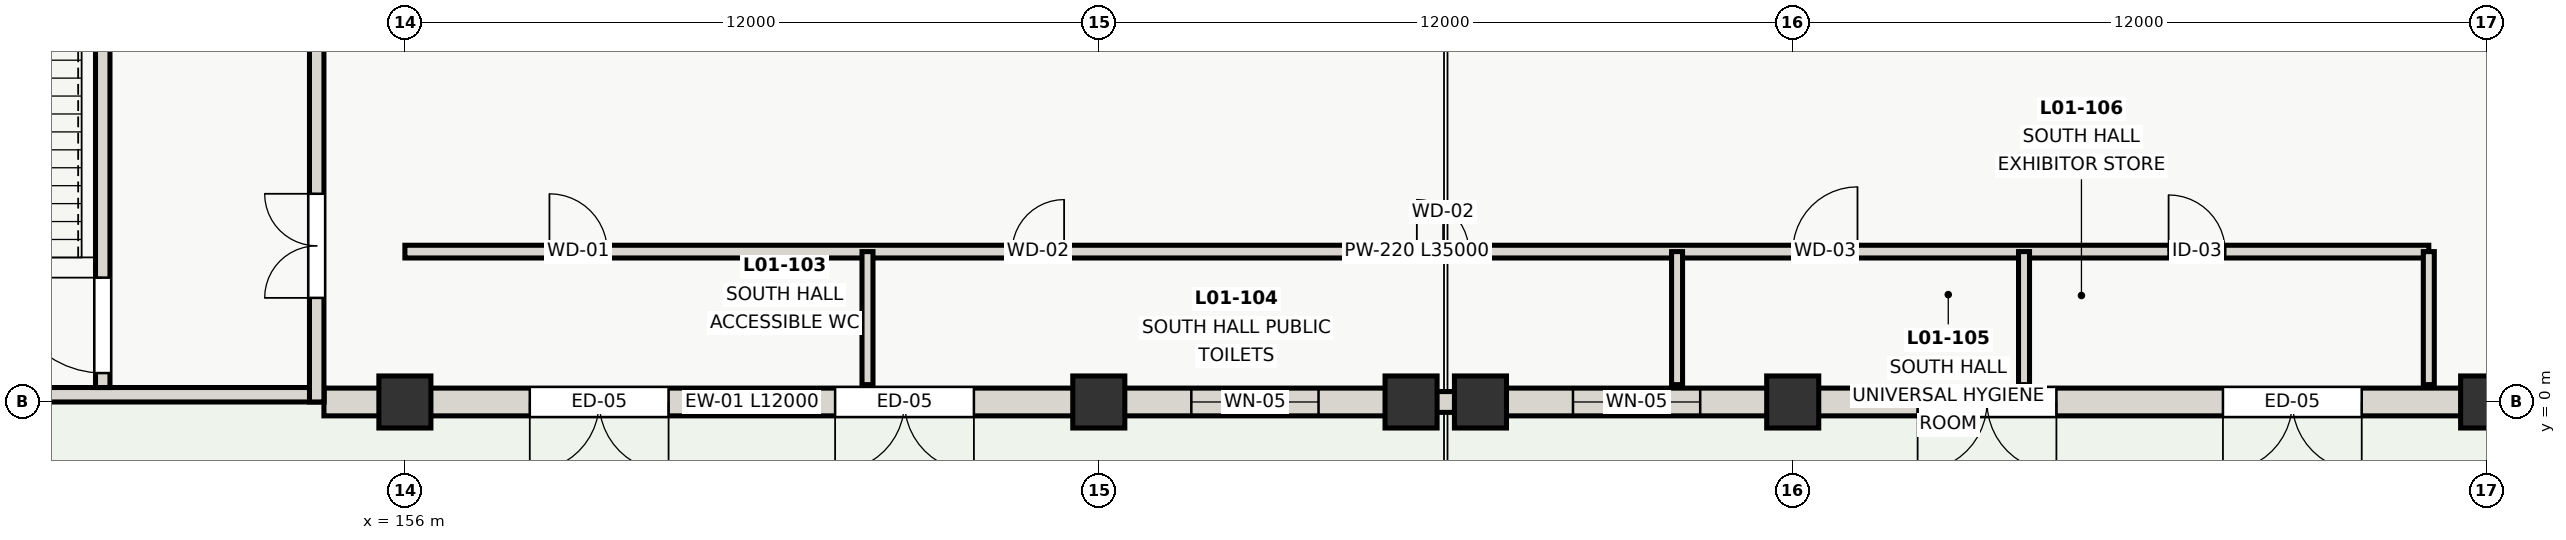
"""IFC4 building model, lengths in metres.
Left out: names, types, materials, properties, quantities, classifications, styles, units other than length and angle.
Written with IfcOpenShell. Run it as: python <this file> out.ifc"""

import sys

from ifc_helpers import new_model, si_unit, direction, frame, frame_2d, origin, origin_2d, place, context, subcontext, project, spatial, rectangle, extrude, element, fill, save


model = new_model("IFC4")
c1 = context("Model", 3, precision=1e-05, world=origin(), true_north=direction((0.0, 1.0)))
c2 = subcontext(c1, "Body", "Model", "MODEL_VIEW")
j1 = project(units=[si_unit("LENGTHUNIT", "METRE"), si_unit("PLANEANGLEUNIT", "RADIAN")], contexts=[c1])
p1 = place(None, origin())
s1 = spatial("IfcSite", under=j1, at=p1, CompositionType="ELEMENT")
p2 = place(p1, origin())
s2 = spatial("IfcBuilding", under=s1, at=p2, CompositionType="ELEMENT")
p3 = place(p2, origin())
s3 = spatial("IfcBuildingStorey", under=s2, at=p3, CompositionType="ELEMENT", Elevation=0.0)
for number, where, z_axis, x_axis in (
    (1, (156.0, 0.0, 0.0), (0.0, 0.0, 1.0), (1.0, 0.0, 0.0)),
    (2, (168.0, 0.0, 0.0), (0.0, 0.0, 1.0), (1.0, 0.0, 0.0)),
    (3, (173.4, 0.0, 0.0), (0.0, 0.0, 1.0), (1.0, 0.0, 0.0)),
    (4, (174.6, 0.0, 0.0), (0.0, 0.0, 1.0), (1.0, 0.0, 0.0)),
    (5, (180.0, 0.0, 0.0), (0.0, 0.0, 1.0), (1.0, 0.0, 0.0)),
    (6, (192.0, 0.0, 0.0), (0.0, 0.0, 1.0), (1.0, 0.0, 0.0)),
):
    element("IfcColumn", number, at=place(p3, frame(where, z_axis=z_axis, x_axis=x_axis)), inside=s3, PredefinedType="COLUMN", context=c2, shape_type="SweptSolid", body=[
        extrude(rectangle(XDim=0.9, YDim=0.9, at=origin_2d()), origin(), (0.0, 0.0, 1.0), 4.2),
    ])
p4 = place(p3, frame((156.0, 0.0, 0.0), z_axis=(0.0, 0.0, 1.0), x_axis=(-1.0, 0.0, 0.0)))
e7 = element("IfcWall", 7, at=p4, inside=s3, PredefinedType="SOLIDWALL", context=c2, shape_type="SweptSolid", body=[
    extrude(rectangle(XDim=1.4, YDim=0.48, at=frame_2d((0.7, 0.0))), origin(), (0.0, 0.0, 1.0), 3.58),
])
p5 = place(p3, frame((168.0, 0.0, 0.0), z_axis=(0.0, 0.0, 1.0), x_axis=(-1.0, 0.0, 0.0)))
e8 = element("IfcWall", 8, at=p5, inside=s3, PredefinedType="SOLIDWALL", context=c2, shape_type="SweptSolid", body=[
    extrude(rectangle(XDim=12.0, YDim=0.48, at=frame_2d((6.0, 0.0))), origin(), (0.0, 0.0, 1.0), 3.58),
])
p6 = place(p5, frame((2.16, 0.0, 0.0)))
e9 = element("IfcOpeningElement", 9, at=p6, cuts=e8, PredefinedType="OPENING", context=c2, shape_type="SweptSolid", body=[
    extrude(rectangle(XDim=2.4, YDim=2.3, at=frame_2d((1.2, 1.15))), frame((0.0, 0.25, 0.0), z_axis=(0.0, -1.0, 0.0), x_axis=(1.0, 0.0, 0.0)), (0.0, 0.0, 1.0), 0.5),
])
p7 = place(p5, frame((7.44, 0.0, 0.0)))
e10 = element("IfcOpeningElement", 10, at=p7, cuts=e8, PredefinedType="OPENING", context=c2, shape_type="SweptSolid", body=[
    extrude(rectangle(XDim=2.4, YDim=2.3, at=frame_2d((1.2, 1.15))), frame((0.0, 0.25, 0.0), z_axis=(0.0, -1.0, 0.0), x_axis=(1.0, 0.0, 0.0)), (0.0, 0.0, 1.0), 0.5),
])
p8 = place(p3, frame((173.4, 0.0, 0.0), z_axis=(0.0, 0.0, 1.0), x_axis=(-1.0, 0.0, 0.0)))
e11 = element("IfcWall", 11, at=p8, inside=s3, PredefinedType="SOLIDWALL", context=c2, shape_type="SweptSolid", body=[
    extrude(rectangle(XDim=5.4, YDim=0.48, at=frame_2d((2.7, 0.0))), origin(), (0.0, 0.0, 1.0), 3.58),
])
p9 = place(p8, frame((1.6, 0.0, 0.9)))
e12 = element("IfcOpeningElement", 12, at=p9, cuts=e11, PredefinedType="OPENING", context=c2, shape_type="SweptSolid", body=[
    extrude(rectangle(XDim=2.2, YDim=2.05, at=frame_2d((1.1, 1.025))), frame((0.0, 0.25, 0.0), z_axis=(0.0, -1.0, 0.0), x_axis=(1.0, 0.0, 0.0)), (0.0, 0.0, 1.0), 0.5),
])
p10 = place(p3, frame((180.0, 0.0, 0.0), z_axis=(0.0, 0.0, 1.0), x_axis=(-1.0, 0.0, 0.0)))
e13 = element("IfcWall", 13, at=p10, inside=s3, PredefinedType="SOLIDWALL", context=c2, shape_type="SweptSolid", body=[
    extrude(rectangle(XDim=5.4, YDim=0.48, at=frame_2d((2.7, 0.0))), origin(), (0.0, 0.0, 1.0), 3.58),
])
p11 = place(p10, frame((1.6, 0.0, 0.9)))
e14 = element("IfcOpeningElement", 14, at=p11, cuts=e13, PredefinedType="OPENING", context=c2, shape_type="SweptSolid", body=[
    extrude(rectangle(XDim=2.2, YDim=2.05, at=frame_2d((1.1, 1.025))), frame((0.0, 0.25, 0.0), z_axis=(0.0, -1.0, 0.0), x_axis=(1.0, 0.0, 0.0)), (0.0, 0.0, 1.0), 0.5),
])
p12 = place(p3, frame((192.0, 0.0, 0.0), z_axis=(0.0, 0.0, 1.0), x_axis=(-1.0, 0.0, 0.0)))
e15 = element("IfcWall", 15, at=p12, inside=s3, PredefinedType="SOLIDWALL", context=c2, shape_type="SweptSolid", body=[
    extrude(rectangle(XDim=12.0, YDim=0.48, at=frame_2d((6.0, 0.0))), origin(), (0.0, 0.0, 1.0), 3.58),
])
p13 = place(p12, frame((2.16, 0.0, 0.0)))
e16 = element("IfcOpeningElement", 16, at=p13, cuts=e15, PredefinedType="OPENING", context=c2, shape_type="SweptSolid", body=[
    extrude(rectangle(XDim=2.4, YDim=2.3, at=frame_2d((1.2, 1.15))), frame((0.0, 0.25, 0.0), z_axis=(0.0, -1.0, 0.0), x_axis=(1.0, 0.0, 0.0)), (0.0, 0.0, 1.0), 0.5),
])
p14 = place(p12, frame((7.44, 0.0, 0.0)))
e17 = element("IfcOpeningElement", 17, at=p14, cuts=e15, PredefinedType="OPENING", context=c2, shape_type="SweptSolid", body=[
    extrude(rectangle(XDim=2.4, YDim=2.3, at=frame_2d((1.2, 1.15))), frame((0.0, 0.25, 0.0), z_axis=(0.0, -1.0, 0.0), x_axis=(1.0, 0.0, 0.0)), (0.0, 0.0, 1.0), 0.5),
])
p15 = place(p3, frame((174.6, 0.0, 0.0), z_axis=(0.0, 0.0, 1.0), x_axis=(-1.0, 0.0, 0.0)))
e18 = element("IfcWall", 18, at=p15, inside=s3, PredefinedType="SOLIDWALL", context=c2, shape_type="SweptSolid", body=[
    extrude(rectangle(XDim=1.2, YDim=0.36, at=frame_2d((0.6, 0.0))), origin(), (0.0, 0.0, 1.0), 4.2),
])
p16 = place(p3, frame((154.6, 0.125, 0.0), z_axis=(0.0, 0.0, 1.0), x_axis=(-1.0, 0.0, 0.0)))
e19 = element("IfcWall", 19, at=p16, inside=s3, PredefinedType="SHEAR", context=c2, shape_type="SweptSolid", body=[
    extrude(rectangle(XDim=9.2, YDim=0.25, at=frame_2d((4.6, 0.0))), origin(), (0.0, 0.0, 1.0), 4.2),
])
p17 = place(p16, frame((5.9, 0.0, 0.0)))
e20 = element("IfcOpeningElement", 20, at=p17, cuts=e19, PredefinedType="OPENING", context=c2, shape_type="SweptSolid", body=[
    extrude(rectangle(XDim=1.9, YDim=2.2, at=frame_2d((0.95, 1.1))), frame((0.0, 0.135, 0.0), z_axis=(0.0, -1.0, 0.0), x_axis=(1.0, 0.0, 0.0)), (0.0, 0.0, 1.0), 0.27),
])
p18 = place(p3, frame((154.475, 0.0, 0.0), z_axis=(0.0, 0.0, 1.0), x_axis=(0.0, 1.0, 0.0)))
e21 = element("IfcWall", 21, at=p18, inside=s3, PredefinedType="SHEAR", context=c2, shape_type="SweptSolid", body=[
    extrude(rectangle(XDim=9.2, YDim=0.25, at=frame_2d((4.6, 0.0))), origin(), (0.0, 0.0, 1.0), 4.2),
])
p19 = place(p18, frame((1.8, 0.0, 0.0)))
e22 = element("IfcOpeningElement", 22, at=p19, cuts=e21, PredefinedType="OPENING", context=c2, shape_type="SweptSolid", body=[
    extrude(rectangle(XDim=1.8, YDim=2.15, at=frame_2d((0.9, 1.075))), frame((0.0, 0.135, 0.0), z_axis=(0.0, -1.0, 0.0), x_axis=(1.0, 0.0, 0.0)), (0.0, 0.0, 1.0), 0.27),
])
p20 = place(p3, frame((150.775, 0.25, 0.0), z_axis=(0.0, 0.0, 1.0), x_axis=(0.0, 1.0, 0.0)))
e23 = element("IfcWall", 23, at=p20, inside=s3, PredefinedType="SHEAR", context=c2, shape_type="SweptSolid", body=[
    extrude(rectangle(XDim=8.7, YDim=0.25, at=frame_2d((4.35, 0.0))), origin(), (0.0, 0.0, 1.0), 4.2),
])
p21 = place(p20, frame((0.25, 0.0, 0.0)))
e24 = element("IfcOpeningElement", 24, at=p21, cuts=e23, PredefinedType="OPENING", context=c2, shape_type="SweptSolid", body=[
    extrude(rectangle(XDim=1.65, YDim=2.1, at=frame_2d((0.825, 1.05))), frame((0.0, 0.135, 0.0), z_axis=(0.0, -1.0, 0.0), x_axis=(1.0, 0.0, 0.0)), (0.0, 0.0, 1.0), 0.27),
])
p22 = place(p3, frame((156.0, 2.6, 0.0), z_axis=(0.0, 0.0, 1.0), x_axis=(1.0, 0.0, 0.0)))
e25 = element("IfcWall", 25, at=p22, inside=s3, PredefinedType="PLUMBINGWALL", context=c2, shape_type="SweptSolid", body=[
    extrude(rectangle(XDim=35.0, YDim=0.22, at=frame_2d((17.5, 0.0))), origin(), (0.0, 0.0, 1.0), 3.7),
])
p23 = place(p22, frame((2.5, 0.0, 0.0)))
e26 = element("IfcOpeningElement", 26, at=p23, cuts=e25, PredefinedType="OPENING", context=c2, shape_type="SweptSolid", body=[
    extrude(rectangle(XDim=1.0, YDim=2.1, at=frame_2d((0.5, 1.05))), frame((0.0, 0.12, 0.0), z_axis=(0.0, -1.0, 0.0), x_axis=(1.0, 0.0, 0.0)), (0.0, 0.0, 1.0), 0.24),
])
p24 = place(p22, frame((10.5, 0.0, 0.0)))
e27 = element("IfcOpeningElement", 27, at=p24, cuts=e25, PredefinedType="OPENING", context=c2, shape_type="SweptSolid", body=[
    extrude(rectangle(XDim=0.9, YDim=2.05, at=frame_2d((0.45, 1.025))), frame((0.0, 0.12, 0.0), z_axis=(0.0, -1.0, 0.0), x_axis=(1.0, 0.0, 0.0)), (0.0, 0.0, 1.0), 0.24),
])
p25 = place(p22, frame((17.5, 0.0, 0.0)))
e28 = element("IfcOpeningElement", 28, at=p25, cuts=e25, PredefinedType="OPENING", context=c2, shape_type="SweptSolid", body=[
    extrude(rectangle(XDim=0.9, YDim=2.05, at=frame_2d((0.45, 1.025))), frame((0.0, 0.12, 0.0), z_axis=(0.0, -1.0, 0.0), x_axis=(1.0, 0.0, 0.0)), (0.0, 0.0, 1.0), 0.24),
])
p26 = place(p22, frame((24.0, 0.0, 0.0)))
e29 = element("IfcOpeningElement", 29, at=p26, cuts=e25, PredefinedType="OPENING", context=c2, shape_type="SweptSolid", body=[
    extrude(rectangle(XDim=1.12, YDim=2.1, at=frame_2d((0.56, 1.05))), frame((0.0, 0.12, 0.0), z_axis=(0.0, -1.0, 0.0), x_axis=(1.0, 0.0, 0.0)), (0.0, 0.0, 1.0), 0.24),
])
p27 = place(p22, frame((30.5, 0.0, 0.0)))
e30 = element("IfcOpeningElement", 30, at=p27, cuts=e25, PredefinedType="OPENING", context=c2, shape_type="SweptSolid", body=[
    extrude(rectangle(XDim=0.98, YDim=2.1, at=frame_2d((0.49, 1.05))), frame((0.0, 0.12, 0.0), z_axis=(0.0, -1.0, 0.0), x_axis=(1.0, 0.0, 0.0)), (0.0, 0.0, 1.0), 0.24),
])
for number, where, z_axis, x_axis in (
    (31, (164.0, 0.3, 0.0), (0.0, 0.0, 1.0), (0.0, 1.0, 0.0)),
    (32, (178.0, 0.3, 0.0), (0.0, 0.0, 1.0), (0.0, 1.0, 0.0)),
    (33, (184.0, 0.3, 0.0), (0.0, 0.0, 1.0), (0.0, 1.0, 0.0)),
    (34, (191.0, 0.3, 0.0), (0.0, 0.0, 1.0), (0.0, 1.0, 0.0)),
):
    element("IfcWall", number, at=place(p3, frame(where, z_axis=z_axis, x_axis=x_axis)), inside=s3, PredefinedType="PLUMBINGWALL", context=c2, shape_type="SweptSolid", body=[
        extrude(rectangle(XDim=2.3, YDim=0.19, at=frame_2d((1.15, 0.0))), origin(), (0.0, 0.0, 1.0), 3.7),
    ])
p28 = place(p6, origin())
e35 = element("IfcDoor", 35, at=p28, inside=s3, OperationType="DOUBLE_DOOR_SINGLE_SWING", PredefinedType="DOOR", context=c2, shape_type="SweptSolid", body=[
    extrude(rectangle(XDim=2.4, YDim=2.3, at=frame_2d((1.2, 1.15))), frame((0.0, 0.025, 0.0), z_axis=(0.0, -1.0, 0.0), x_axis=(1.0, 0.0, 0.0)), (0.0, 0.0, 1.0), 0.05),
])
fill(e9, e35)
p29 = place(p7, origin())
e36 = element("IfcDoor", 36, at=p29, inside=s3, OperationType="DOUBLE_DOOR_SINGLE_SWING", PredefinedType="DOOR", context=c2, shape_type="SweptSolid", body=[
    extrude(rectangle(XDim=2.4, YDim=2.3, at=frame_2d((1.2, 1.15))), frame((0.0, 0.025, 0.0), z_axis=(0.0, -1.0, 0.0), x_axis=(1.0, 0.0, 0.0)), (0.0, 0.0, 1.0), 0.05),
])
fill(e10, e36)
p30 = place(p9, origin())
e37 = element("IfcWindow", 37, at=p30, inside=s3, PartitioningType="SINGLE_PANEL", PredefinedType="WINDOW", context=c2, shape_type="SweptSolid", body=[
    extrude(rectangle(XDim=2.2, YDim=2.05, at=frame_2d((1.1, 1.025))), frame((0.0, 0.03, 0.0), z_axis=(0.0, -1.0, 0.0), x_axis=(1.0, 0.0, 0.0)), (0.0, 0.0, 1.0), 0.06),
])
fill(e12, e37)
p31 = place(p11, origin())
e38 = element("IfcWindow", 38, at=p31, inside=s3, PartitioningType="SINGLE_PANEL", PredefinedType="WINDOW", context=c2, shape_type="SweptSolid", body=[
    extrude(rectangle(XDim=2.2, YDim=2.05, at=frame_2d((1.1, 1.025))), frame((0.0, 0.03, 0.0), z_axis=(0.0, -1.0, 0.0), x_axis=(1.0, 0.0, 0.0)), (0.0, 0.0, 1.0), 0.06),
])
fill(e14, e38)
p32 = place(p13, origin())
e39 = element("IfcDoor", 39, at=p32, inside=s3, OperationType="DOUBLE_DOOR_SINGLE_SWING", PredefinedType="DOOR", context=c2, shape_type="SweptSolid", body=[
    extrude(rectangle(XDim=2.4, YDim=2.3, at=frame_2d((1.2, 1.15))), frame((0.0, 0.025, 0.0), z_axis=(0.0, -1.0, 0.0), x_axis=(1.0, 0.0, 0.0)), (0.0, 0.0, 1.0), 0.05),
])
fill(e16, e39)
p33 = place(p14, origin())
e40 = element("IfcDoor", 40, at=p33, inside=s3, OperationType="DOUBLE_DOOR_SINGLE_SWING", PredefinedType="DOOR", context=c2, shape_type="SweptSolid", body=[
    extrude(rectangle(XDim=2.4, YDim=2.3, at=frame_2d((1.2, 1.15))), frame((0.0, 0.025, 0.0), z_axis=(0.0, -1.0, 0.0), x_axis=(1.0, 0.0, 0.0)), (0.0, 0.0, 1.0), 0.05),
])
fill(e17, e40)
p34 = place(p19, origin())
e41 = element("IfcDoor", 41, at=p34, inside=s3, OperationType="DOUBLE_DOOR_SINGLE_SWING", PredefinedType="DOOR", context=c2, shape_type="SweptSolid", body=[
    extrude(rectangle(XDim=1.8, YDim=2.15, at=frame_2d((0.9, 1.075))), frame((0.0, 0.025, 0.0), z_axis=(0.0, -1.0, 0.0), x_axis=(1.0, 0.0, 0.0)), (0.0, 0.0, 1.0), 0.05),
])
fill(e22, e41)
p35 = place(p21, origin())
e42 = element("IfcDoor", 42, at=p35, inside=s3, OperationType="SINGLE_SWING_RIGHT", PredefinedType="DOOR", context=c2, shape_type="SweptSolid", body=[
    extrude(rectangle(XDim=1.65, YDim=2.1, at=frame_2d((0.825, 1.05))), frame((0.0, 0.025, 0.0), z_axis=(0.0, -1.0, 0.0), x_axis=(1.0, 0.0, 0.0)), (0.0, 0.0, 1.0), 0.05),
])
fill(e24, e42)
p36 = place(p23, origin())
e43 = element("IfcDoor", 43, at=p36, inside=s3, OperationType="SINGLE_SWING_LEFT", PredefinedType="DOOR", context=c2, shape_type="SweptSolid", body=[
    extrude(rectangle(XDim=1.0, YDim=2.1, at=frame_2d((0.5, 1.05))), frame((0.0, 0.025, 0.0), z_axis=(0.0, -1.0, 0.0), x_axis=(1.0, 0.0, 0.0)), (0.0, 0.0, 1.0), 0.05),
])
fill(e26, e43)
p37 = place(p24, origin())
e44 = element("IfcDoor", 44, at=p37, inside=s3, OperationType="SINGLE_SWING_RIGHT", PredefinedType="DOOR", context=c2, shape_type="SweptSolid", body=[
    extrude(rectangle(XDim=0.9, YDim=2.05, at=frame_2d((0.45, 1.025))), frame((0.0, 0.025, 0.0), z_axis=(0.0, -1.0, 0.0), x_axis=(1.0, 0.0, 0.0)), (0.0, 0.0, 1.0), 0.05),
])
fill(e27, e44)
p38 = place(p25, origin())
e45 = element("IfcDoor", 45, at=p38, inside=s3, OperationType="SINGLE_SWING_LEFT", PredefinedType="DOOR", context=c2, shape_type="SweptSolid", body=[
    extrude(rectangle(XDim=0.9, YDim=2.05, at=frame_2d((0.45, 1.025))), frame((0.0, 0.025, 0.0), z_axis=(0.0, -1.0, 0.0), x_axis=(1.0, 0.0, 0.0)), (0.0, 0.0, 1.0), 0.05),
])
fill(e28, e45)
p39 = place(p26, origin())
e46 = element("IfcDoor", 46, at=p39, inside=s3, OperationType="SINGLE_SWING_RIGHT", PredefinedType="DOOR", context=c2, shape_type="SweptSolid", body=[
    extrude(rectangle(XDim=1.12, YDim=2.1, at=frame_2d((0.56, 1.05))), frame((0.0, 0.025, 0.0), z_axis=(0.0, -1.0, 0.0), x_axis=(1.0, 0.0, 0.0)), (0.0, 0.0, 1.0), 0.05),
])
fill(e29, e46)
p40 = place(p27, origin())
e47 = element("IfcDoor", 47, at=p40, inside=s3, OperationType="SINGLE_SWING_LEFT", PredefinedType="DOOR", context=c2, shape_type="SweptSolid", body=[
    extrude(rectangle(XDim=0.98, YDim=2.1, at=frame_2d((0.49, 1.05))), frame((0.0, 0.025, 0.0), z_axis=(0.0, -1.0, 0.0), x_axis=(1.0, 0.0, 0.0)), (0.0, 0.0, 1.0), 0.05),
])
fill(e30, e47)
save(model, sys.argv[1])
